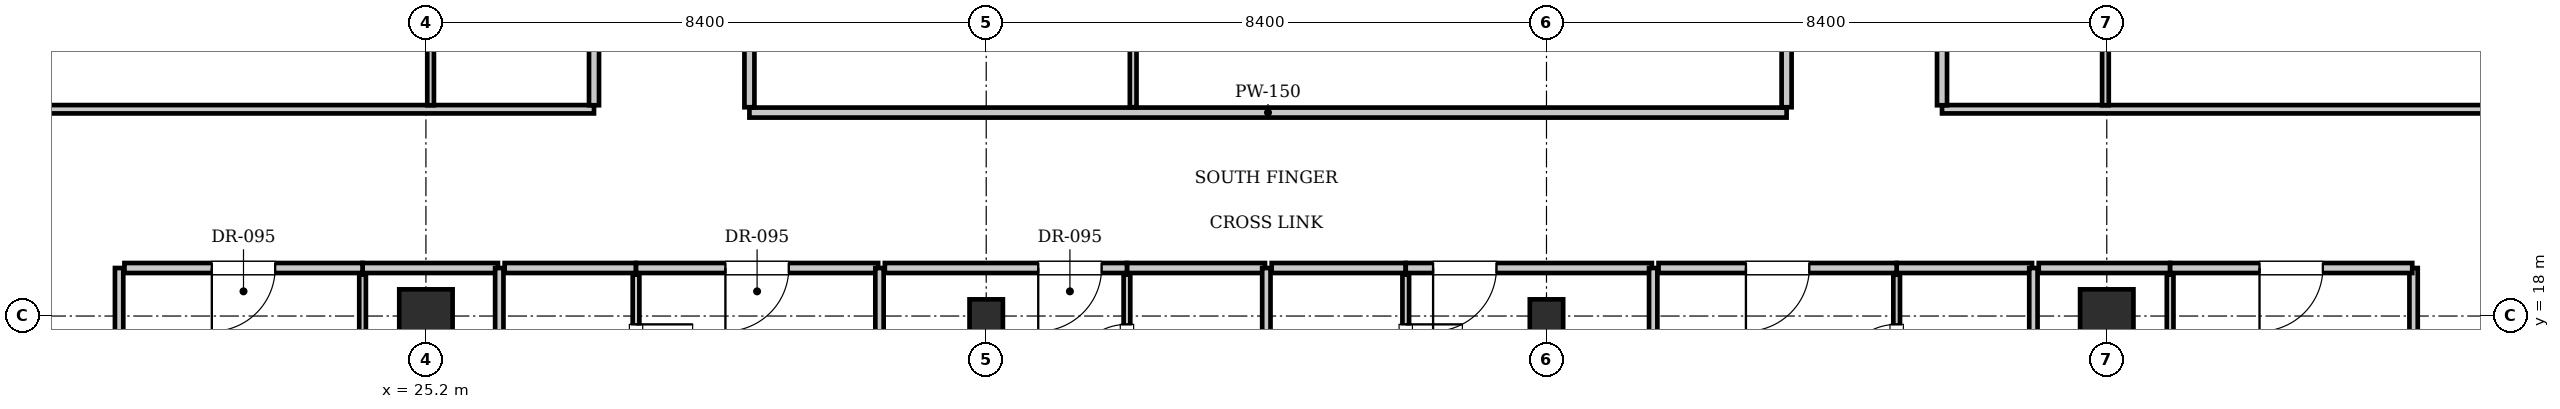
"""IFC4 building model, lengths in metres.
Left out: names, types, materials, properties, quantities, classifications, styles, units other than length and angle.
Written with IfcOpenShell. Run it as: python <this file> out.ifc"""

import sys

from ifc_helpers import new_model, si_unit, direction, frame, frame_2d, origin, origin_2d, place, context, subcontext, project, spatial, rectangle, i_section, extrude, element, fill, save


model = new_model("IFC4")
c1 = context("Model", 3, precision=1e-05, world=origin(), true_north=direction((0.0, 1.0)))
c2 = subcontext(c1, "Body", "Model", "MODEL_VIEW")
j1 = project(units=[si_unit("LENGTHUNIT", "METRE"), si_unit("PLANEANGLEUNIT", "RADIAN")], contexts=[c1])
p1 = place(None, origin())
s1 = spatial("IfcSite", under=j1, at=p1, CompositionType="ELEMENT")
p2 = place(p1, origin())
s2 = spatial("IfcBuilding", under=s1, at=p2, CompositionType="ELEMENT")
p3 = place(p2, frame((0.0, 0.0, 247.1)))
s3 = spatial("IfcBuildingStorey", under=s2, at=p3, CompositionType="ELEMENT", Elevation=247.1)
for number, where, z_axis, x_axis in (
    (1, (25.2, 18.0, 0.0), (0.0, 0.0, 1.0), (1.0, 0.0, 0.0)),
    (2, (50.4, 18.0, 0.0), (0.0, 0.0, 1.0), (1.0, 0.0, 0.0)),
):
    element("IfcColumn", number, at=place(p3, frame(where, z_axis=z_axis, x_axis=x_axis)), inside=s3, PredefinedType="COLUMN", context=c2, shape_type="SweptSolid", body=[
        extrude(rectangle(XDim=0.8, YDim=0.8, at=origin_2d()), origin(), (0.0, 0.0, 1.0), 3.85),
    ])
for number, where, z_axis, x_axis in (
    (3, (33.6, 18.0, 0.0), (0.0, 0.0, 1.0), (1.0, 0.0, 0.0)),
    (4, (42.0, 18.0, 0.0), (0.0, 0.0, 1.0), (1.0, 0.0, 0.0)),
):
    element("IfcColumn", number, at=place(p3, frame(where, z_axis=z_axis, x_axis=x_axis)), inside=s3, PredefinedType="COLUMN", context=c2, shape_type="SweptSolid", body=[
        extrude(i_section(OverallWidth=0.5, OverallDepth=0.5, WebThickness=0.022, FlangeThickness=0.032, at=origin_2d()), origin(), (0.0, 0.0, 1.0), 3.85),
    ])
p4 = place(p3, frame((30.05, 21.05, 0.0), z_axis=(0.0, 0.0, 1.0), x_axis=(1.0, 0.0, 0.0)))
e5 = element("IfcWall", 5, at=p4, inside=s3, PredefinedType="PARTITIONING", context=c2, shape_type="SweptSolid", body=[
    extrude(rectangle(XDim=15.55, YDim=0.15, at=frame_2d((7.775, 0.0))), origin(), (0.0, 0.0, 1.0), 3.61),
])
for number, where, z_axis, x_axis in (
    (6, (30.05, 21.13, 0.0), (0.0, 0.0, 1.0), (0.0, 1.0, 0.0)),
    (7, (45.6, 21.13, 0.0), (0.0, 0.0, 1.0), (0.0, 1.0, 0.0)),
):
    element("IfcWall", number, at=place(p3, frame(where, z_axis=z_axis, x_axis=x_axis)), inside=s3, PredefinedType="PARTITIONING", context=c2, shape_type="SweptSolid", body=[
        extrude(rectangle(XDim=9.49, YDim=0.15, at=frame_2d((4.745, 0.0))), origin(), (0.0, 0.0, 1.0), 3.61),
    ])
p5 = place(p3, frame((35.803, 21.13, 0.0), z_axis=(0.0, 0.0, 1.0), x_axis=(0.0, 1.0, 0.0)))
e8 = element("IfcWall", 8, at=p5, inside=s3, PredefinedType="PARTITIONING", context=c2, shape_type="SweptSolid", body=[
    extrude(rectangle(XDim=9.49, YDim=0.1, at=frame_2d((4.745, 0.0))), origin(), (0.0, 0.0, 1.0), 3.61),
])
for number, where, z_axis, x_axis in (
    (9, (20.6, 14.4, 0.0), (0.0, 0.0, 1.0), (0.0, 1.0, 0.0)),
    (10, (55.0, 14.4, 0.0), (0.0, 0.0, 1.0), (0.0, 1.0, 0.0)),
):
    element("IfcWall", number, at=place(p3, frame(where, z_axis=z_axis, x_axis=x_axis)), inside=s3, PredefinedType="PARTITIONING", context=c2, shape_type="SweptSolid", body=[
        extrude(rectangle(XDim=4.32, YDim=0.125, at=frame_2d((2.16, 0.0))), origin(), (0.0, 0.0, 1.0), 3.61),
    ])
p6 = place(p3, frame((24.25, 18.72, 0.0), z_axis=(0.0, 0.0, 1.0), x_axis=(1.0, 0.0, 0.0)))
e11 = element("IfcWall", 11, at=p6, inside=s3, PredefinedType="PARTITIONING", context=c2, shape_type="SweptSolid", body=[
    extrude(rectangle(XDim=2.03, YDim=0.15, at=frame_2d((1.015, 0.0))), origin(), (0.0, 0.0, 1.0), 3.61),
])
p7 = place(p3, frame((24.25, 16.28, 0.0), z_axis=(0.0, 0.0, 1.0), x_axis=(0.0, 1.0, 0.0)))
e12 = element("IfcWall", 12, at=p7, inside=s3, PredefinedType="PARTITIONING", context=c2, shape_type="SweptSolid", body=[
    extrude(rectangle(XDim=2.34, YDim=0.1, at=frame_2d((1.17, 0.0))), origin(), (0.0, 0.0, 1.0), 3.61),
])
p8 = place(p7, frame((0.265, 0.0, 0.0)))
e13 = element("IfcOpeningElement", 13, at=p8, cuts=e12, PredefinedType="OPENING", context=c2, shape_type="SweptSolid", body=[
    extrude(rectangle(XDim=0.85, YDim=2.1, at=frame_2d((0.425, 1.05))), frame((0.0, 0.06, 0.0), z_axis=(0.0, -1.0, 0.0), x_axis=(1.0, 0.0, 0.0)), (0.0, 0.0, 1.0), 0.12),
])
p9 = place(p3, frame((20.68, 18.72, 0.0), z_axis=(0.0, 0.0, 1.0), x_axis=(1.0, 0.0, 0.0)))
e14 = element("IfcWall", 14, at=p9, inside=s3, PredefinedType="PARTITIONING", context=c2, shape_type="SweptSolid", body=[
    extrude(rectangle(XDim=3.57, YDim=0.15, at=frame_2d((1.785, 0.0))), origin(), (0.0, 0.0, 1.0), 3.61),
])
p10 = place(p9, frame((1.31, 0.0, 0.0)))
e15 = element("IfcOpeningElement", 15, at=p10, cuts=e14, PredefinedType="OPENING", context=c2, shape_type="SweptSolid", body=[
    extrude(rectangle(XDim=0.95, YDim=2.15, at=frame_2d((0.475, 1.075))), frame((0.0, 0.085, 0.0), z_axis=(0.0, -1.0, 0.0), x_axis=(1.0, 0.0, 0.0)), (0.0, 0.0, 1.0), 0.17),
])
p11 = place(p3, frame((26.3, 9.3, 0.0), z_axis=(0.0, 0.0, 1.0), x_axis=(0.0, 1.0, 0.0)))
e16 = element("IfcWall", 16, at=p11, inside=s3, PredefinedType="PARTITIONING", context=c2, shape_type="SweptSolid", body=[
    extrude(rectangle(XDim=9.42, YDim=0.125, at=frame_2d((4.71, 0.0))), origin(), (0.0, 0.0, 1.0), 3.61),
])
p12 = place(p3, frame((26.38, 18.72, 0.0), z_axis=(0.0, 0.0, 1.0), x_axis=(1.0, 0.0, 0.0)))
e17 = element("IfcWall", 17, at=p12, inside=s3, PredefinedType="PARTITIONING", context=c2, shape_type="SweptSolid", body=[
    extrude(rectangle(XDim=1.97, YDim=0.15, at=frame_2d((0.985, 0.0))), origin(), (0.0, 0.0, 1.0), 3.61),
])
p13 = place(p3, frame((28.35, 16.28, 0.0), z_axis=(0.0, 0.0, 1.0), x_axis=(0.0, 1.0, 0.0)))
e18 = element("IfcWall", 18, at=p13, inside=s3, PredefinedType="PARTITIONING", context=c2, shape_type="SweptSolid", body=[
    extrude(rectangle(XDim=2.34, YDim=0.1, at=frame_2d((1.17, 0.0))), origin(), (0.0, 0.0, 1.0), 3.61),
])
p14 = place(p13, frame((0.745, 0.0, 0.0)))
e19 = element("IfcOpeningElement", 19, at=p14, cuts=e18, PredefinedType="OPENING", context=c2, shape_type="SweptSolid", body=[
    extrude(rectangle(XDim=0.85, YDim=2.1, at=frame_2d((0.425, 1.05))), frame((0.0, 0.06, 0.0), z_axis=(0.0, -1.0, 0.0), x_axis=(1.0, 0.0, 0.0)), (0.0, 0.0, 1.0), 0.12),
])
p15 = place(p3, frame((28.35, 18.72, 0.0), z_axis=(0.0, 0.0, 1.0), x_axis=(1.0, 0.0, 0.0)))
e20 = element("IfcWall", 20, at=p15, inside=s3, PredefinedType="PARTITIONING", context=c2, shape_type="SweptSolid", body=[
    extrude(rectangle(XDim=3.63, YDim=0.15, at=frame_2d((1.815, 0.0))), origin(), (0.0, 0.0, 1.0), 3.61),
])
p16 = place(p15, frame((1.34, 0.0, 0.0)))
e21 = element("IfcOpeningElement", 21, at=p16, cuts=e20, PredefinedType="OPENING", context=c2, shape_type="SweptSolid", body=[
    extrude(rectangle(XDim=0.95, YDim=2.15, at=frame_2d((0.475, 1.075))), frame((0.0, 0.085, 0.0), z_axis=(0.0, -1.0, 0.0), x_axis=(1.0, 0.0, 0.0)), (0.0, 0.0, 1.0), 0.17),
])
p17 = place(p3, frame((32.0, 9.3, 0.0), z_axis=(0.0, 0.0, 1.0), x_axis=(0.0, 1.0, 0.0)))
e22 = element("IfcWall", 22, at=p17, inside=s3, PredefinedType="PARTITIONING", context=c2, shape_type="SweptSolid", body=[
    extrude(rectangle(XDim=9.42, YDim=0.125, at=frame_2d((4.71, 0.0))), origin(), (0.0, 0.0, 1.0), 3.61),
])
p18 = place(p3, frame((35.71, 18.72, 0.0), z_axis=(0.0, 0.0, 1.0), x_axis=(1.0, 0.0, 0.0)))
e23 = element("IfcWall", 23, at=p18, inside=s3, PredefinedType="PARTITIONING", context=c2, shape_type="SweptSolid", body=[
    extrude(rectangle(XDim=2.07, YDim=0.15, at=frame_2d((1.035, 0.0))), origin(), (0.0, 0.0, 1.0), 3.61),
])
p19 = place(p3, frame((35.71, 16.28, 0.0), z_axis=(0.0, 0.0, 1.0), x_axis=(0.0, 1.0, 0.0)))
e24 = element("IfcWall", 24, at=p19, inside=s3, PredefinedType="PARTITIONING", context=c2, shape_type="SweptSolid", body=[
    extrude(rectangle(XDim=2.34, YDim=0.1, at=frame_2d((1.17, 0.0))), origin(), (0.0, 0.0, 1.0), 3.61),
])
p20 = place(p19, frame((0.745, 0.0, 0.0)))
e25 = element("IfcOpeningElement", 25, at=p20, cuts=e24, PredefinedType="OPENING", context=c2, shape_type="SweptSolid", body=[
    extrude(rectangle(XDim=0.85, YDim=2.1, at=frame_2d((0.425, 1.05))), frame((0.0, 0.06, 0.0), z_axis=(0.0, -1.0, 0.0), x_axis=(1.0, 0.0, 0.0)), (0.0, 0.0, 1.0), 0.12),
])
p21 = place(p3, frame((32.08, 18.72, 0.0), z_axis=(0.0, 0.0, 1.0), x_axis=(1.0, 0.0, 0.0)))
e26 = element("IfcWall", 26, at=p21, inside=s3, PredefinedType="PARTITIONING", context=c2, shape_type="SweptSolid", body=[
    extrude(rectangle(XDim=3.63, YDim=0.15, at=frame_2d((1.815, 0.0))), origin(), (0.0, 0.0, 1.0), 3.61),
])
p22 = place(p21, frame((2.3, 0.0, 0.0)))
e27 = element("IfcOpeningElement", 27, at=p22, cuts=e26, PredefinedType="OPENING", context=c2, shape_type="SweptSolid", body=[
    extrude(rectangle(XDim=0.95, YDim=2.15, at=frame_2d((0.475, 1.075))), frame((0.0, 0.085, 0.0), z_axis=(0.0, -1.0, 0.0), x_axis=(1.0, 0.0, 0.0)), (0.0, 0.0, 1.0), 0.17),
])
p23 = place(p3, frame((37.8, 9.3, 0.0), z_axis=(0.0, 0.0, 1.0), x_axis=(0.0, 1.0, 0.0)))
e28 = element("IfcWall", 28, at=p23, inside=s3, PredefinedType="PARTITIONING", context=c2, shape_type="SweptSolid", body=[
    extrude(rectangle(XDim=9.42, YDim=0.125, at=frame_2d((4.71, 0.0))), origin(), (0.0, 0.0, 1.0), 3.344),
])
p24 = place(p3, frame((37.88, 18.72, 0.0), z_axis=(0.0, 0.0, 1.0), x_axis=(1.0, 0.0, 0.0)))
e29 = element("IfcWall", 29, at=p24, inside=s3, PredefinedType="PARTITIONING", context=c2, shape_type="SweptSolid", body=[
    extrude(rectangle(XDim=2.01, YDim=0.15, at=frame_2d((1.005, 0.0))), origin(), (0.0, 0.0, 1.0), 3.61),
])
p25 = place(p3, frame((39.89, 16.28, 0.0), z_axis=(0.0, 0.0, 1.0), x_axis=(0.0, 1.0, 0.0)))
e30 = element("IfcWall", 30, at=p25, inside=s3, PredefinedType="PARTITIONING", context=c2, shape_type="SweptSolid", body=[
    extrude(rectangle(XDim=2.34, YDim=0.1, at=frame_2d((1.17, 0.0))), origin(), (0.0, 0.0, 1.0), 3.61),
])
p26 = place(p25, frame((0.745, 0.0, 0.0)))
e31 = element("IfcOpeningElement", 31, at=p26, cuts=e30, PredefinedType="OPENING", context=c2, shape_type="SweptSolid", body=[
    extrude(rectangle(XDim=0.85, YDim=2.1, at=frame_2d((0.425, 1.05))), frame((0.0, 0.06, 0.0), z_axis=(0.0, -1.0, 0.0), x_axis=(1.0, 0.0, 0.0)), (0.0, 0.0, 1.0), 0.12),
])
p27 = place(p3, frame((39.89, 18.72, 0.0), z_axis=(0.0, 0.0, 1.0), x_axis=(1.0, 0.0, 0.0)))
e32 = element("IfcWall", 32, at=p27, inside=s3, PredefinedType="PARTITIONING", context=c2, shape_type="SweptSolid", body=[
    extrude(rectangle(XDim=3.69, YDim=0.15, at=frame_2d((1.845, 0.0))), origin(), (0.0, 0.0, 1.0), 3.61),
])
p28 = place(p27, frame((0.41, 0.0, 0.0)))
e33 = element("IfcOpeningElement", 33, at=p28, cuts=e32, PredefinedType="OPENING", context=c2, shape_type="SweptSolid", body=[
    extrude(rectangle(XDim=0.95, YDim=2.15, at=frame_2d((0.475, 1.075))), frame((0.0, 0.085, 0.0), z_axis=(0.0, -1.0, 0.0), x_axis=(1.0, 0.0, 0.0)), (0.0, 0.0, 1.0), 0.17),
])
p29 = place(p3, frame((43.6, 9.3, 0.0), z_axis=(0.0, 0.0, 1.0), x_axis=(0.0, 1.0, 0.0)))
e34 = element("IfcWall", 34, at=p29, inside=s3, PredefinedType="PARTITIONING", context=c2, shape_type="SweptSolid", body=[
    extrude(rectangle(XDim=9.42, YDim=0.125, at=frame_2d((4.71, 0.0))), origin(), (0.0, 0.0, 1.0), 3.61),
])
p30 = place(p3, frame((47.25, 18.72, 0.0), z_axis=(0.0, 0.0, 1.0), x_axis=(1.0, 0.0, 0.0)))
e35 = element("IfcWall", 35, at=p30, inside=s3, PredefinedType="PARTITIONING", context=c2, shape_type="SweptSolid", body=[
    extrude(rectangle(XDim=2.03, YDim=0.15, at=frame_2d((1.015, 0.0))), origin(), (0.0, 0.0, 1.0), 3.61),
])
p31 = place(p3, frame((47.25, 16.28, 0.0), z_axis=(0.0, 0.0, 1.0), x_axis=(0.0, 1.0, 0.0)))
e36 = element("IfcWall", 36, at=p31, inside=s3, PredefinedType="PARTITIONING", context=c2, shape_type="SweptSolid", body=[
    extrude(rectangle(XDim=2.34, YDim=0.1, at=frame_2d((1.17, 0.0))), origin(), (0.0, 0.0, 1.0), 3.61),
])
p32 = place(p31, frame((0.745, 0.0, 0.0)))
e37 = element("IfcOpeningElement", 37, at=p32, cuts=e36, PredefinedType="OPENING", context=c2, shape_type="SweptSolid", body=[
    extrude(rectangle(XDim=0.85, YDim=2.1, at=frame_2d((0.425, 1.05))), frame((0.0, 0.06, 0.0), z_axis=(0.0, -1.0, 0.0), x_axis=(1.0, 0.0, 0.0)), (0.0, 0.0, 1.0), 0.12),
])
p33 = place(p3, frame((43.68, 18.72, 0.0), z_axis=(0.0, 0.0, 1.0), x_axis=(1.0, 0.0, 0.0)))
e38 = element("IfcWall", 38, at=p33, inside=s3, PredefinedType="PARTITIONING", context=c2, shape_type="SweptSolid", body=[
    extrude(rectangle(XDim=3.57, YDim=0.15, at=frame_2d((1.785, 0.0))), origin(), (0.0, 0.0, 1.0), 3.61),
])
p34 = place(p33, frame((1.31, 0.0, 0.0)))
e39 = element("IfcOpeningElement", 39, at=p34, cuts=e38, PredefinedType="OPENING", context=c2, shape_type="SweptSolid", body=[
    extrude(rectangle(XDim=0.95, YDim=2.15, at=frame_2d((0.475, 1.075))), frame((0.0, 0.085, 0.0), z_axis=(0.0, -1.0, 0.0), x_axis=(1.0, 0.0, 0.0)), (0.0, 0.0, 1.0), 0.17),
])
p35 = place(p3, frame((49.3, 9.3, 0.0), z_axis=(0.0, 0.0, 1.0), x_axis=(0.0, 1.0, 0.0)))
e40 = element("IfcWall", 40, at=p35, inside=s3, PredefinedType="PARTITIONING", context=c2, shape_type="SweptSolid", body=[
    extrude(rectangle(XDim=9.42, YDim=0.125, at=frame_2d((4.71, 0.0))), origin(), (0.0, 0.0, 1.0), 3.61),
])
p36 = place(p3, frame((49.38, 18.72, 0.0), z_axis=(0.0, 0.0, 1.0), x_axis=(1.0, 0.0, 0.0)))
e41 = element("IfcWall", 41, at=p36, inside=s3, PredefinedType="PARTITIONING", context=c2, shape_type="SweptSolid", body=[
    extrude(rectangle(XDim=1.97, YDim=0.15, at=frame_2d((0.985, 0.0))), origin(), (0.0, 0.0, 1.0), 3.61),
])
p37 = place(p3, frame((51.35, 16.28, 0.0), z_axis=(0.0, 0.0, 1.0), x_axis=(0.0, 1.0, 0.0)))
e42 = element("IfcWall", 42, at=p37, inside=s3, PredefinedType="PARTITIONING", context=c2, shape_type="SweptSolid", body=[
    extrude(rectangle(XDim=2.34, YDim=0.1, at=frame_2d((1.17, 0.0))), origin(), (0.0, 0.0, 1.0), 3.61),
])
p38 = place(p37, frame((0.265, 0.0, 0.0)))
e43 = element("IfcOpeningElement", 43, at=p38, cuts=e42, PredefinedType="OPENING", context=c2, shape_type="SweptSolid", body=[
    extrude(rectangle(XDim=0.85, YDim=2.1, at=frame_2d((0.425, 1.05))), frame((0.0, 0.06, 0.0), z_axis=(0.0, -1.0, 0.0), x_axis=(1.0, 0.0, 0.0)), (0.0, 0.0, 1.0), 0.12),
])
p39 = place(p3, frame((51.35, 18.72, 0.0), z_axis=(0.0, 0.0, 1.0), x_axis=(1.0, 0.0, 0.0)))
e44 = element("IfcWall", 44, at=p39, inside=s3, PredefinedType="PARTITIONING", context=c2, shape_type="SweptSolid", body=[
    extrude(rectangle(XDim=3.63, YDim=0.15, at=frame_2d((1.815, 0.0))), origin(), (0.0, 0.0, 1.0), 3.61),
])
p40 = place(p39, frame((1.34, 0.0, 0.0)))
e45 = element("IfcOpeningElement", 45, at=p40, cuts=e44, PredefinedType="OPENING", context=c2, shape_type="SweptSolid", body=[
    extrude(rectangle(XDim=0.95, YDim=2.15, at=frame_2d((0.475, 1.075))), frame((0.0, 0.085, 0.0), z_axis=(0.0, -1.0, 0.0), x_axis=(1.0, 0.0, 0.0)), (0.0, 0.0, 1.0), 0.17),
])
p41 = place(p3, frame((15.5, 21.1, 0.0), z_axis=(0.0, 0.0, 1.0), x_axis=(1.0, 0.0, 0.0)))
e46 = element("IfcWall", 46, at=p41, inside=s3, PredefinedType="PARTITIONING", context=c2, shape_type="SweptSolid", body=[
    extrude(rectangle(XDim=12.22, YDim=0.125, at=frame_2d((6.11, 0.0))), origin(), (0.0, 0.0, 1.0), 3.61),
])
p42 = place(p3, frame((47.93, 21.1, 0.0), z_axis=(0.0, 0.0, 1.0), x_axis=(1.0, 0.0, 0.0)))
e47 = element("IfcWall", 47, at=p42, inside=s3, PredefinedType="PARTITIONING", context=c2, shape_type="SweptSolid", body=[
    extrude(rectangle(XDim=12.17, YDim=0.125, at=frame_2d((6.085, 0.0))), origin(), (0.0, 0.0, 1.0), 3.61),
])
p43 = place(p3, frame((27.72, 21.16, 0.0), z_axis=(0.0, 0.0, 1.0), x_axis=(0.0, 1.0, 0.0)))
e48 = element("IfcWall", 48, at=p43, inside=s3, PredefinedType="PARTITIONING", context=c2, shape_type="SweptSolid", body=[
    extrude(rectangle(XDim=1.97, YDim=0.15, at=frame_2d((0.985, 0.0))), origin(), (0.0, 0.0, 1.0), 3.61),
])
p44 = place(p3, frame((25.27, 21.16, 0.0), z_axis=(0.0, 0.0, 1.0), x_axis=(0.0, 1.0, 0.0)))
e49 = element("IfcWall", 49, at=p44, inside=s3, PredefinedType="PARTITIONING", context=c2, shape_type="SweptSolid", body=[
    extrude(rectangle(XDim=1.97, YDim=0.1, at=frame_2d((0.985, 0.0))), origin(), (0.0, 0.0, 1.0), 3.077),
])
p45 = place(p3, frame((47.93, 21.16, 0.0), z_axis=(0.0, 0.0, 1.0), x_axis=(0.0, 1.0, 0.0)))
e50 = element("IfcWall", 50, at=p45, inside=s3, PredefinedType="PARTITIONING", context=c2, shape_type="SweptSolid", body=[
    extrude(rectangle(XDim=1.97, YDim=0.15, at=frame_2d((0.985, 0.0))), origin(), (0.0, 0.0, 1.0), 3.61),
])
p46 = place(p3, frame((50.38, 21.16, 0.0), z_axis=(0.0, 0.0, 1.0), x_axis=(0.0, 1.0, 0.0)))
e51 = element("IfcWall", 51, at=p46, inside=s3, PredefinedType="PARTITIONING", context=c2, shape_type="SweptSolid", body=[
    extrude(rectangle(XDim=1.97, YDim=0.1, at=frame_2d((0.985, 0.0))), origin(), (0.0, 0.0, 1.0), 3.077),
])
p47 = place(p10, frame((0.95, 0.0, 0.0), z_axis=(0.0, 0.0, 1.0), x_axis=(-1.0, 0.0, 0.0)))
e52 = element("IfcDoor", 52, at=p47, inside=s3, OperationType="SINGLE_SWING_RIGHT", PredefinedType="DOOR", context=c2, shape_type="SweptSolid", body=[
    extrude(rectangle(XDim=0.95, YDim=2.15, at=frame_2d((0.475, 1.075))), frame((0.0, 0.025, 0.0), z_axis=(0.0, -1.0, 0.0), x_axis=(1.0, 0.0, 0.0)), (0.0, 0.0, 1.0), 0.05),
])
fill(e15, e52)
p48 = place(p14, frame((0.85, 0.0, 0.0), z_axis=(0.0, 0.0, 1.0), x_axis=(-1.0, 0.0, 0.0)))
e53 = element("IfcDoor", 53, at=p48, inside=s3, OperationType="SINGLE_SWING_LEFT", PredefinedType="DOOR", context=c2, shape_type="SweptSolid", body=[
    extrude(rectangle(XDim=0.85, YDim=2.1, at=frame_2d((0.425, 1.05))), frame((0.0, 0.025, 0.0), z_axis=(0.0, -1.0, 0.0), x_axis=(1.0, 0.0, 0.0)), (0.0, 0.0, 1.0), 0.05),
])
fill(e19, e53)
p49 = place(p16, frame((0.95, 0.0, 0.0), z_axis=(0.0, 0.0, 1.0), x_axis=(-1.0, 0.0, 0.0)))
e54 = element("IfcDoor", 54, at=p49, inside=s3, OperationType="SINGLE_SWING_RIGHT", PredefinedType="DOOR", context=c2, shape_type="SweptSolid", body=[
    extrude(rectangle(XDim=0.95, YDim=2.15, at=frame_2d((0.475, 1.075))), frame((0.0, 0.025, 0.0), z_axis=(0.0, -1.0, 0.0), x_axis=(1.0, 0.0, 0.0)), (0.0, 0.0, 1.0), 0.05),
])
fill(e21, e54)
p50 = place(p20, origin())
e55 = element("IfcDoor", 55, at=p50, inside=s3, OperationType="SINGLE_SWING_LEFT", PredefinedType="DOOR", context=c2, shape_type="SweptSolid", body=[
    extrude(rectangle(XDim=0.85, YDim=2.1, at=frame_2d((0.425, 1.05))), frame((0.0, 0.025, 0.0), z_axis=(0.0, -1.0, 0.0), x_axis=(1.0, 0.0, 0.0)), (0.0, 0.0, 1.0), 0.05),
])
fill(e25, e55)
p51 = place(p22, frame((0.95, 0.0, 0.0), z_axis=(0.0, 0.0, 1.0), x_axis=(-1.0, 0.0, 0.0)))
e56 = element("IfcDoor", 56, at=p51, inside=s3, OperationType="SINGLE_SWING_RIGHT", PredefinedType="DOOR", context=c2, shape_type="SweptSolid", body=[
    extrude(rectangle(XDim=0.95, YDim=2.15, at=frame_2d((0.475, 1.075))), frame((0.0, 0.025, 0.0), z_axis=(0.0, -1.0, 0.0), x_axis=(1.0, 0.0, 0.0)), (0.0, 0.0, 1.0), 0.05),
])
fill(e27, e56)
p52 = place(p26, frame((0.85, 0.0, 0.0), z_axis=(0.0, 0.0, 1.0), x_axis=(-1.0, 0.0, 0.0)))
e57 = element("IfcDoor", 57, at=p52, inside=s3, OperationType="SINGLE_SWING_LEFT", PredefinedType="DOOR", context=c2, shape_type="SweptSolid", body=[
    extrude(rectangle(XDim=0.85, YDim=2.1, at=frame_2d((0.425, 1.05))), frame((0.0, 0.025, 0.0), z_axis=(0.0, -1.0, 0.0), x_axis=(1.0, 0.0, 0.0)), (0.0, 0.0, 1.0), 0.05),
])
fill(e31, e57)
p53 = place(p28, frame((0.95, 0.0, 0.0), z_axis=(0.0, 0.0, 1.0), x_axis=(-1.0, 0.0, 0.0)))
e58 = element("IfcDoor", 58, at=p53, inside=s3, OperationType="SINGLE_SWING_RIGHT", PredefinedType="DOOR", context=c2, shape_type="SweptSolid", body=[
    extrude(rectangle(XDim=0.95, YDim=2.15, at=frame_2d((0.475, 1.075))), frame((0.0, 0.025, 0.0), z_axis=(0.0, -1.0, 0.0), x_axis=(1.0, 0.0, 0.0)), (0.0, 0.0, 1.0), 0.05),
])
fill(e33, e58)
p54 = place(p32, origin())
e59 = element("IfcDoor", 59, at=p54, inside=s3, OperationType="SINGLE_SWING_LEFT", PredefinedType="DOOR", context=c2, shape_type="SweptSolid", body=[
    extrude(rectangle(XDim=0.85, YDim=2.1, at=frame_2d((0.425, 1.05))), frame((0.0, 0.025, 0.0), z_axis=(0.0, -1.0, 0.0), x_axis=(1.0, 0.0, 0.0)), (0.0, 0.0, 1.0), 0.05),
])
fill(e37, e59)
p55 = place(p34, frame((0.95, 0.0, 0.0), z_axis=(0.0, 0.0, 1.0), x_axis=(-1.0, 0.0, 0.0)))
e60 = element("IfcDoor", 60, at=p55, inside=s3, OperationType="SINGLE_SWING_RIGHT", PredefinedType="DOOR", context=c2, shape_type="SweptSolid", body=[
    extrude(rectangle(XDim=0.95, YDim=2.15, at=frame_2d((0.475, 1.075))), frame((0.0, 0.025, 0.0), z_axis=(0.0, -1.0, 0.0), x_axis=(1.0, 0.0, 0.0)), (0.0, 0.0, 1.0), 0.05),
])
fill(e39, e60)
p56 = place(p40, frame((0.95, 0.0, 0.0), z_axis=(0.0, 0.0, 1.0), x_axis=(-1.0, 0.0, 0.0)))
e61 = element("IfcDoor", 61, at=p56, inside=s3, OperationType="SINGLE_SWING_RIGHT", PredefinedType="DOOR", context=c2, shape_type="SweptSolid", body=[
    extrude(rectangle(XDim=0.95, YDim=2.15, at=frame_2d((0.475, 1.075))), frame((0.0, 0.025, 0.0), z_axis=(0.0, -1.0, 0.0), x_axis=(1.0, 0.0, 0.0)), (0.0, 0.0, 1.0), 0.05),
])
fill(e45, e61)
save(model, sys.argv[1])
